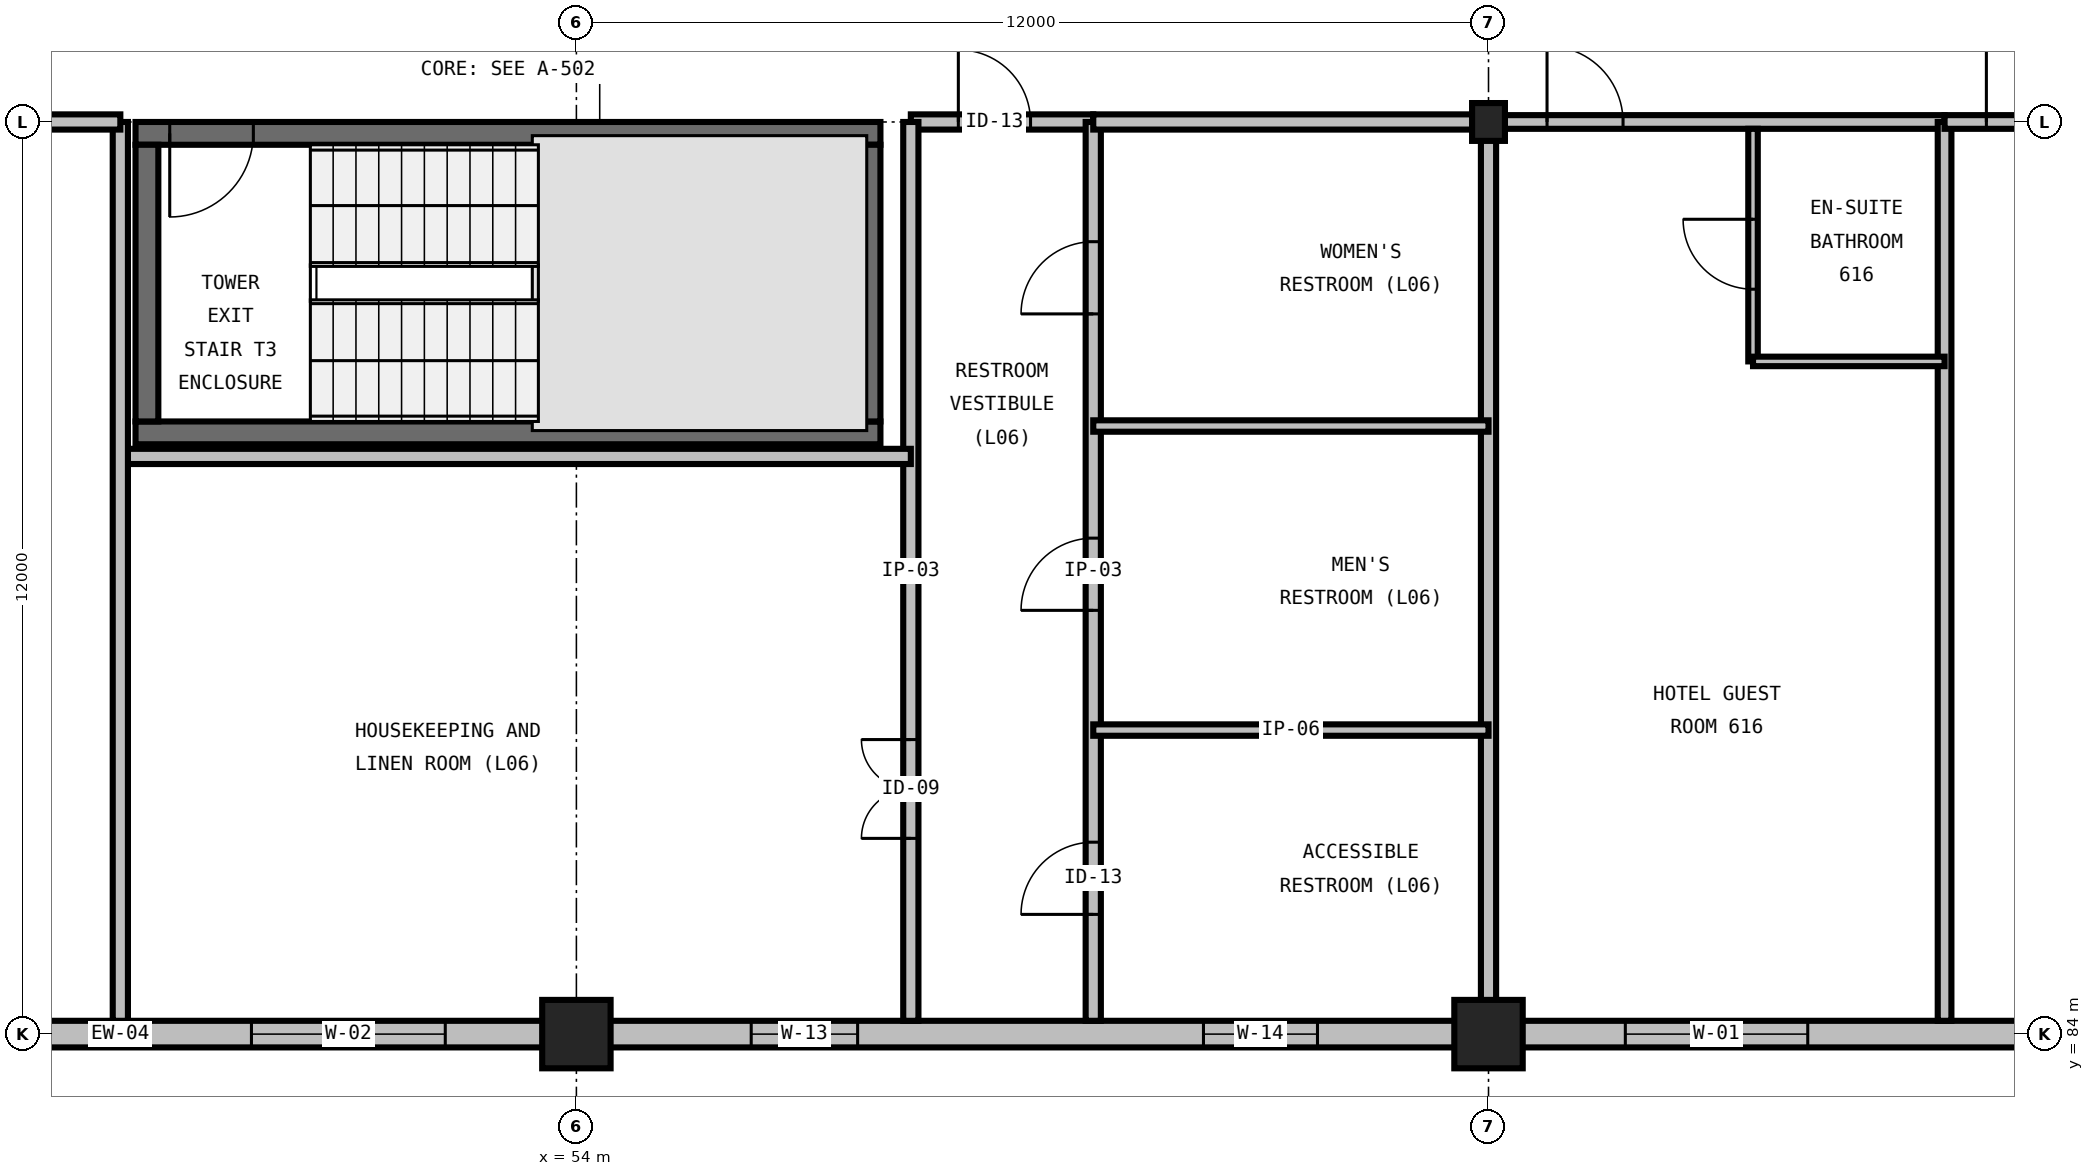
"""IFC4 building model, lengths in metres.
Left out: names, types, materials, properties, quantities, classifications, styles, units other than length and angle.
Written with IfcOpenShell. Run it as: python <this file> out.ifc"""

import sys

from ifc_helpers import new_model, si_unit, direction, frame, frame_2d, origin, origin_2d, place, context, subcontext, project, spatial, rectangle, i_section, extrude, element, fill, save


model = new_model("IFC4")
c1 = context("Model", 3, precision=1e-05, world=origin(), true_north=direction((0.0, 1.0)))
c2 = subcontext(c1, "Body", "Model", "MODEL_VIEW")
j1 = project(units=[si_unit("LENGTHUNIT", "METRE"), si_unit("PLANEANGLEUNIT", "RADIAN")], contexts=[c1])
p1 = place(None, origin())
s1 = spatial("IfcSite", under=j1, at=p1, CompositionType="ELEMENT")
p2 = place(p1, origin())
s2 = spatial("IfcBuilding", under=s1, at=p2, CompositionType="ELEMENT")
p3 = place(p2, frame((0.0, 0.0, 31.2)))
s3 = spatial("IfcBuildingStorey", under=s2, at=p3, CompositionType="ELEMENT", Elevation=31.2)
for number, where, z_axis, x_axis in (
    (1, (54.0, 84.0, 0.0), (0.0, 0.0, 1.0), (1.0, 0.0, 0.0)),
    (2, (66.0, 84.0, 0.0), (0.0, 0.0, 1.0), (1.0, 0.0, 0.0)),
):
    element("IfcColumn", number, at=place(p3, frame(where, z_axis=z_axis, x_axis=x_axis)), inside=s3, PredefinedType="COLUMN", context=c2, shape_type="SweptSolid", body=[
        extrude(rectangle(XDim=0.9, YDim=0.9, at=origin_2d()), origin(), (0.0, 0.0, 1.0), 3.6),
    ])
p4 = place(p3, frame((66.0, 96.0, 0.0), z_axis=(0.0, 0.0, 1.0), x_axis=(1.0, 0.0, 0.0)))
e3 = element("IfcColumn", 3, at=p4, inside=s3, PredefinedType="COLUMN", context=c2, shape_type="SweptSolid", body=[
    extrude(i_section(OverallWidth=0.432, OverallDepth=0.498, WebThickness=0.056, FlangeThickness=0.089, FilletRadius=0.031, at=origin_2d()), origin(), (0.0, 0.0, 1.0), 3.6),
])
p5 = place(p3, frame((48.2, 91.91, 0.0), z_axis=(0.0, 0.0, 1.0), x_axis=(1.0, 0.0, 0.0)))
e4 = element("IfcWall", 4, at=p5, inside=s3, PredefinedType="SHEAR", context=c2, shape_type="SweptSolid", body=[
    extrude(rectangle(XDim=9.8, YDim=0.3, at=frame_2d((4.9, 0.0))), origin(), (0.0, 0.0, 1.0), 3.6),
])
p6 = place(p3, frame((58.0, 95.85, 0.0), z_axis=(0.0, 0.0, 1.0), x_axis=(-1.0, 0.0, 0.0)))
e5 = element("IfcWall", 5, at=p6, inside=s3, PredefinedType="SHEAR", context=c2, shape_type="SweptSolid", body=[
    extrude(rectangle(XDim=9.8, YDim=0.3, at=frame_2d((4.9, 0.0))), origin(), (0.0, 0.0, 1.0), 3.6),
])
p7 = place(p6, frame((8.25, 0.0, 0.0)))
e6 = element("IfcOpeningElement", 6, at=p7, cuts=e5, PredefinedType="OPENING", context=c2, shape_type="SweptSolid", body=[
    extrude(rectangle(XDim=1.1, YDim=2.2, at=frame_2d((0.55, 1.1))), frame((0.0, 0.165, 0.0), z_axis=(0.0, -1.0, 0.0), x_axis=(1.0, 0.0, 0.0)), (0.0, 0.0, 1.0), 0.33),
])
for number, where, z_axis, x_axis in (
    (7, (48.35, 95.7, 0.0), (0.0, 0.0, 1.0), (0.0, -1.0, 0.0)),
    (8, (57.85, 92.06, 0.0), (0.0, 0.0, 1.0), (0.0, 1.0, 0.0)),
):
    element("IfcWall", number, at=place(p3, frame(where, z_axis=z_axis, x_axis=x_axis)), inside=s3, PredefinedType="SHEAR", context=c2, shape_type="SweptSolid", body=[
        extrude(rectangle(XDim=3.64, YDim=0.3, at=frame_2d((1.82, 0.0))), origin(), (0.0, 0.0, 1.0), 3.6),
    ])
p8 = place(p3, frame((42.0, 84.0, 0.0), z_axis=(0.0, 0.0, 1.0), x_axis=(1.0, 0.0, 0.0)))
e9 = element("IfcWall", 9, at=p8, inside=s3, PredefinedType="STANDARD", context=c2, shape_type="SweptSolid", body=[
    extrude(rectangle(XDim=12.0, YDim=0.35, at=frame_2d((6.0, 0.0))), origin(), (0.0, 0.0, 1.0), 2.486),
])
p9 = place(p8, frame((1.8, 0.0, 0.75)))
e10 = element("IfcOpeningElement", 10, at=p9, cuts=e9, PredefinedType="OPENING", context=c2, shape_type="SweptSolid", body=[
    extrude(rectangle(XDim=2.4, YDim=1.65, at=frame_2d((1.2, 0.825))), frame((0.0, 0.19, 0.0), z_axis=(0.0, -1.0, 0.0), x_axis=(1.0, 0.0, 0.0)), (0.0, 0.0, 1.0), 0.38),
])
p10 = place(p8, frame((7.725, 0.0, 0.75)))
e11 = element("IfcOpeningElement", 11, at=p10, cuts=e9, PredefinedType="OPENING", context=c2, shape_type="SweptSolid", body=[
    extrude(rectangle(XDim=2.55, YDim=1.65, at=frame_2d((1.275, 0.825))), frame((0.0, 0.19, 0.0), z_axis=(0.0, -1.0, 0.0), x_axis=(1.0, 0.0, 0.0)), (0.0, 0.0, 1.0), 0.38),
])
p11 = place(p3, frame((54.0, 84.0, 0.0), z_axis=(0.0, 0.0, 1.0), x_axis=(1.0, 0.0, 0.0)))
e12 = element("IfcWall", 12, at=p11, inside=s3, PredefinedType="STANDARD", context=c2, shape_type="SweptSolid", body=[
    extrude(rectangle(XDim=12.0, YDim=0.35, at=frame_2d((6.0, 0.0))), origin(), (0.0, 0.0, 1.0), 2.486),
])
p12 = place(p11, frame((2.3, 0.0, 1.0)))
e13 = element("IfcOpeningElement", 13, at=p12, cuts=e12, PredefinedType="OPENING", context=c2, shape_type="SweptSolid", body=[
    extrude(rectangle(XDim=1.4, YDim=1.4, at=frame_2d((0.7, 0.7))), frame((0.0, 0.19, 0.0), z_axis=(0.0, -1.0, 0.0), x_axis=(1.0, 0.0, 0.0)), (0.0, 0.0, 1.0), 0.38),
])
p13 = place(p11, frame((8.25, 0.0, 1.0)))
e14 = element("IfcOpeningElement", 14, at=p13, cuts=e12, PredefinedType="OPENING", context=c2, shape_type="SweptSolid", body=[
    extrude(rectangle(XDim=1.5, YDim=1.35, at=frame_2d((0.75, 0.675))), frame((0.0, 0.19, 0.0), z_axis=(0.0, -1.0, 0.0), x_axis=(1.0, 0.0, 0.0)), (0.0, 0.0, 1.0), 0.38),
])
p14 = place(p3, frame((66.0, 84.0, 0.0), z_axis=(0.0, 0.0, 1.0), x_axis=(1.0, 0.0, 0.0)))
e15 = element("IfcWall", 15, at=p14, inside=s3, PredefinedType="STANDARD", context=c2, shape_type="SweptSolid", body=[
    extrude(rectangle(XDim=12.0, YDim=0.35, at=frame_2d((6.0, 0.0))), origin(), (0.0, 0.0, 1.0), 2.486),
])
p15 = place(p14, frame((1.8, 0.0, 0.75)))
e16 = element("IfcOpeningElement", 16, at=p15, cuts=e15, PredefinedType="OPENING", context=c2, shape_type="SweptSolid", body=[
    extrude(rectangle(XDim=2.4, YDim=1.65, at=frame_2d((1.2, 0.825))), frame((0.0, 0.19, 0.0), z_axis=(0.0, -1.0, 0.0), x_axis=(1.0, 0.0, 0.0)), (0.0, 0.0, 1.0), 0.38),
])
p16 = place(p14, frame((7.725, 0.0, 0.75)))
e17 = element("IfcOpeningElement", 17, at=p16, cuts=e15, PredefinedType="OPENING", context=c2, shape_type="SweptSolid", body=[
    extrude(rectangle(XDim=2.55, YDim=1.65, at=frame_2d((1.275, 0.825))), frame((0.0, 0.19, 0.0), z_axis=(0.0, -1.0, 0.0), x_axis=(1.0, 0.0, 0.0)), (0.0, 0.0, 1.0), 0.38),
])
p17 = place(p3, frame((58.4, 96.0, 0.0), z_axis=(0.0, 0.0, 1.0), x_axis=(1.0, 0.0, 0.0)))
e18 = element("IfcWall", 18, at=p17, inside=s3, PredefinedType="PARTITIONING", context=c2, shape_type="SweptSolid", body=[
    extrude(rectangle(XDim=2.4, YDim=0.2, at=frame_2d((1.2, 0.0))), origin(), (0.0, 0.0, 1.0), 2.359),
])
p18 = place(p17, frame((0.625, 0.0, 0.0)))
e19 = element("IfcOpeningElement", 19, at=p18, cuts=e18, PredefinedType="OPENING", context=c2, shape_type="SweptSolid", body=[
    extrude(rectangle(XDim=0.95, YDim=2.15, at=frame_2d((0.475, 1.075))), frame((0.0, 0.115, 0.0), z_axis=(0.0, -1.0, 0.0), x_axis=(1.0, 0.0, 0.0)), (0.0, 0.0, 1.0), 0.23),
])
p19 = place(p3, frame((58.4, 84.175, 0.0), z_axis=(0.0, 0.0, 1.0), x_axis=(0.0, 1.0, 0.0)))
e20 = element("IfcWall", 20, at=p19, inside=s3, PredefinedType="PARTITIONING", context=c2, shape_type="SweptSolid", body=[
    extrude(rectangle(XDim=11.825, YDim=0.2, at=frame_2d((5.913, 0.0))), origin(), (0.0, 0.0, 1.0), 3.29),
])
p20 = place(p19, frame((2.4, 0.0, 0.0)))
e21 = element("IfcOpeningElement", 21, at=p20, cuts=e20, PredefinedType="OPENING", context=c2, shape_type="SweptSolid", body=[
    extrude(rectangle(XDim=1.3, YDim=2.2, at=frame_2d((0.65, 1.1))), frame((0.0, 0.115, 0.0), z_axis=(0.0, -1.0, 0.0), x_axis=(1.0, 0.0, 0.0)), (0.0, 0.0, 1.0), 0.23),
])
p21 = place(p3, frame((60.8, 84.175, 0.0), z_axis=(0.0, 0.0, 1.0), x_axis=(0.0, 1.0, 0.0)))
e22 = element("IfcWall", 22, at=p21, inside=s3, PredefinedType="PARTITIONING", context=c2, shape_type="SweptSolid", body=[
    extrude(rectangle(XDim=11.825, YDim=0.2, at=frame_2d((5.913, 0.0))), origin(), (0.0, 0.0, 1.0), 3.29),
])
p22 = place(p21, frame((1.4, 0.0, 0.0)))
e23 = element("IfcOpeningElement", 23, at=p22, cuts=e22, PredefinedType="OPENING", context=c2, shape_type="SweptSolid", body=[
    extrude(rectangle(XDim=0.95, YDim=2.15, at=frame_2d((0.475, 1.075))), frame((0.0, 0.115, 0.0), z_axis=(0.0, -1.0, 0.0), x_axis=(1.0, 0.0, 0.0)), (0.0, 0.0, 1.0), 0.23),
])
p23 = place(p21, frame((5.4, 0.0, 0.0)))
e24 = element("IfcOpeningElement", 24, at=p23, cuts=e22, PredefinedType="OPENING", context=c2, shape_type="SweptSolid", body=[
    extrude(rectangle(XDim=0.95, YDim=2.15, at=frame_2d((0.475, 1.075))), frame((0.0, 0.115, 0.0), z_axis=(0.0, -1.0, 0.0), x_axis=(1.0, 0.0, 0.0)), (0.0, 0.0, 1.0), 0.23),
])
p24 = place(p21, frame((9.3, 0.0, 0.0)))
e25 = element("IfcOpeningElement", 25, at=p24, cuts=e22, PredefinedType="OPENING", context=c2, shape_type="SweptSolid", body=[
    extrude(rectangle(XDim=0.95, YDim=2.15, at=frame_2d((0.475, 1.075))), frame((0.0, 0.115, 0.0), z_axis=(0.0, -1.0, 0.0), x_axis=(1.0, 0.0, 0.0)), (0.0, 0.0, 1.0), 0.23),
])
p25 = place(p3, frame((66.0, 84.175, 0.0), z_axis=(0.0, 0.0, 1.0), x_axis=(0.0, 1.0, 0.0)))
e26 = element("IfcWall", 26, at=p25, inside=s3, PredefinedType="PARTITIONING", context=c2, shape_type="SweptSolid", body=[
    extrude(rectangle(XDim=11.825, YDim=0.2, at=frame_2d((5.913, 0.0))), origin(), (0.0, 0.0, 1.0), 2.59),
])
p26 = place(p3, frame((60.8, 96.0, 0.0), z_axis=(0.0, 0.0, 1.0), x_axis=(1.0, 0.0, 0.0)))
e27 = element("IfcWall", 27, at=p26, inside=s3, PredefinedType="PARTITIONING", context=c2, shape_type="SweptSolid", body=[
    extrude(rectangle(XDim=5.2, YDim=0.2, at=frame_2d((2.6, 0.0))), origin(), (0.0, 0.0, 1.0), 2.359),
])
for number, where, z_axis, x_axis in (
    (28, (60.8, 88.0, 0.0), (0.0, 0.0, 1.0), (1.0, 0.0, 0.0)),
    (29, (60.8, 92.0, 0.0), (0.0, 0.0, 1.0), (1.0, 0.0, 0.0)),
):
    element("IfcWall", number, at=place(p3, frame(where, z_axis=z_axis, x_axis=x_axis)), inside=s3, PredefinedType="PARTITIONING", context=c2, shape_type="SweptSolid", body=[
        extrude(rectangle(XDim=5.2, YDim=0.15, at=frame_2d((2.6, 0.0))), origin(), (0.0, 0.0, 1.0), 3.29),
    ])
p27 = place(p3, frame((48.0, 91.6, 0.0), z_axis=(0.0, 0.0, 1.0), x_axis=(1.0, 0.0, 0.0)))
e30 = element("IfcWall", 30, at=p27, inside=s3, PredefinedType="PARTITIONING", context=c2, shape_type="SweptSolid", body=[
    extrude(rectangle(XDim=10.4, YDim=0.2, at=frame_2d((5.2, 0.0))), origin(), (0.0, 0.0, 1.0), 3.29),
])
p28 = place(p3, frame((48.0, 84.175, 0.0), z_axis=(0.0, 0.0, 1.0), x_axis=(0.0, 1.0, 0.0)))
e31 = element("IfcWall", 31, at=p28, inside=s3, PredefinedType="PARTITIONING", context=c2, shape_type="SweptSolid", body=[
    extrude(rectangle(XDim=11.825, YDim=0.2, at=frame_2d((5.913, 0.0))), origin(), (0.0, 0.0, 1.0), 3.29),
])
p29 = place(p3, frame((42.0, 96.0, 0.0), z_axis=(0.0, 0.0, 1.0), x_axis=(1.0, 0.0, 0.0)))
e32 = element("IfcWall", 32, at=p29, inside=s3, PredefinedType="PARTITIONING", context=c2, shape_type="SweptSolid", body=[
    extrude(rectangle(XDim=6.0, YDim=0.2, at=frame_2d((3.0, 0.0))), origin(), (0.0, 0.0, 1.0), 2.359),
])
p30 = place(p29, frame((2.4, 0.0, 0.0)))
e33 = element("IfcOpeningElement", 33, at=p30, cuts=e32, PredefinedType="OPENING", context=c2, shape_type="SweptSolid", body=[
    extrude(rectangle(XDim=1.8, YDim=2.3, at=frame_2d((0.9, 1.15))), frame((0.0, 0.115, 0.0), z_axis=(0.0, -1.0, 0.0), x_axis=(1.0, 0.0, 0.0)), (0.0, 0.0, 1.0), 0.23),
])
p31 = place(p3, frame((66.0, 96.0, 0.0), z_axis=(0.0, 0.0, 1.0), x_axis=(1.0, 0.0, 0.0)))
e34 = element("IfcWall", 34, at=p31, inside=s3, PredefinedType="PARTITIONING", context=c2, shape_type="SweptSolid", body=[
    extrude(rectangle(XDim=6.0, YDim=0.18, at=frame_2d((3.0, 0.0))), origin(), (0.0, 0.0, 1.0), 2.664),
])
p32 = place(p31, frame((0.77, 0.0, 0.0)))
e35 = element("IfcOpeningElement", 35, at=p32, cuts=e34, PredefinedType="OPENING", context=c2, shape_type="SweptSolid", body=[
    extrude(rectangle(XDim=1.0, YDim=2.15, at=frame_2d((0.5, 1.075))), frame((0.0, 0.105, 0.0), z_axis=(0.0, -1.0, 0.0), x_axis=(1.0, 0.0, 0.0)), (0.0, 0.0, 1.0), 0.21),
])
p33 = place(p3, frame((72.0, 84.175, 0.0), z_axis=(0.0, 0.0, 1.0), x_axis=(0.0, 1.0, 0.0)))
e36 = element("IfcWall", 36, at=p33, inside=s3, PredefinedType="PARTITIONING", context=c2, shape_type="SweptSolid", body=[
    extrude(rectangle(XDim=11.825, YDim=0.18, at=frame_2d((5.913, 0.0))), origin(), (0.0, 0.0, 1.0), 3.29),
])
p34 = place(p3, frame((69.48, 92.85, 0.0), z_axis=(0.0, 0.0, 1.0), x_axis=(0.0, 1.0, 0.0)))
e37 = element("IfcWall", 37, at=p34, inside=s3, PredefinedType="PARTITIONING", context=c2, shape_type="SweptSolid", body=[
    extrude(rectangle(XDim=3.06, YDim=0.125, at=frame_2d((1.53, 0.0))), origin(), (0.0, 0.0, 1.0), 3.29),
])
p35 = place(p34, frame((0.95, 0.0, 0.0)))
e38 = element("IfcOpeningElement", 38, at=p35, cuts=e37, PredefinedType="OPENING", context=c2, shape_type="SweptSolid", body=[
    extrude(rectangle(XDim=0.92, YDim=2.1, at=frame_2d((0.46, 1.05))), frame((0.0, 0.077, 0.0), z_axis=(0.0, -1.0, 0.0), x_axis=(1.0, 0.0, 0.0)), (0.0, 0.0, 1.0), 0.155),
])
p36 = place(p3, frame((69.48, 92.85, 0.0), z_axis=(0.0, 0.0, 1.0), x_axis=(1.0, 0.0, 0.0)))
e39 = element("IfcWall", 39, at=p36, inside=s3, PredefinedType="PARTITIONING", context=c2, shape_type="SweptSolid", body=[
    extrude(rectangle(XDim=2.52, YDim=0.125, at=frame_2d((1.26, 0.0))), origin(), (0.0, 0.0, 1.0), 3.29),
])
p37 = place(p3, frame((72.0, 96.0, 0.0), z_axis=(0.0, 0.0, 1.0), x_axis=(1.0, 0.0, 0.0)))
e40 = element("IfcWall", 40, at=p37, inside=s3, PredefinedType="PARTITIONING", context=c2, shape_type="SweptSolid", body=[
    extrude(rectangle(XDim=6.0, YDim=0.18, at=frame_2d((3.0, 0.0))), origin(), (0.0, 0.0, 1.0), 2.664),
])
p38 = place(p37, frame((0.55, 0.0, 0.0)))
e41 = element("IfcOpeningElement", 41, at=p38, cuts=e40, PredefinedType="OPENING", context=c2, shape_type="SweptSolid", body=[
    extrude(rectangle(XDim=1.0, YDim=2.15, at=frame_2d((0.5, 1.075))), frame((0.0, 0.105, 0.0), z_axis=(0.0, -1.0, 0.0), x_axis=(1.0, 0.0, 0.0)), (0.0, 0.0, 1.0), 0.21),
])
p39 = place(p7, origin())
e42 = element("IfcDoor", 42, at=p39, inside=s3, OperationType="SINGLE_SWING_RIGHT", PredefinedType="DOOR", context=c2, shape_type="SweptSolid", body=[
    extrude(rectangle(XDim=1.1, YDim=2.2, at=frame_2d((0.55, 1.1))), frame((0.0, 0.025, 0.0), z_axis=(0.0, -1.0, 0.0), x_axis=(1.0, 0.0, 0.0)), (0.0, 0.0, 1.0), 0.05),
])
fill(e6, e42)
p40 = place(p10, origin())
e43 = element("IfcWindow", 43, at=p40, inside=s3, PartitioningType="DOUBLE_PANEL_VERTICAL", PredefinedType="WINDOW", context=c2, shape_type="SweptSolid", body=[
    extrude(rectangle(XDim=2.55, YDim=1.65, at=frame_2d((1.275, 0.825))), frame((0.0, 0.03, 0.0), z_axis=(0.0, -1.0, 0.0), x_axis=(1.0, 0.0, 0.0)), (0.0, 0.0, 1.0), 0.06),
])
fill(e11, e43)
p41 = place(p12, origin())
e44 = element("IfcWindow", 44, at=p41, inside=s3, PartitioningType="SINGLE_PANEL", PredefinedType="WINDOW", context=c2, shape_type="SweptSolid", body=[
    extrude(rectangle(XDim=1.4, YDim=1.4, at=frame_2d((0.7, 0.7))), frame((0.0, 0.03, 0.0), z_axis=(0.0, -1.0, 0.0), x_axis=(1.0, 0.0, 0.0)), (0.0, 0.0, 1.0), 0.06),
])
fill(e13, e44)
p42 = place(p13, origin())
e45 = element("IfcWindow", 45, at=p42, inside=s3, PartitioningType="SINGLE_PANEL", PredefinedType="WINDOW", context=c2, shape_type="SweptSolid", body=[
    extrude(rectangle(XDim=1.5, YDim=1.35, at=frame_2d((0.75, 0.675))), frame((0.0, 0.03, 0.0), z_axis=(0.0, -1.0, 0.0), x_axis=(1.0, 0.0, 0.0)), (0.0, 0.0, 1.0), 0.06),
])
fill(e14, e45)
p43 = place(p15, origin())
e46 = element("IfcWindow", 46, at=p43, inside=s3, PartitioningType="DOUBLE_PANEL_VERTICAL", PredefinedType="WINDOW", context=c2, shape_type="SweptSolid", body=[
    extrude(rectangle(XDim=2.4, YDim=1.65, at=frame_2d((1.2, 0.825))), frame((0.0, 0.03, 0.0), z_axis=(0.0, -1.0, 0.0), x_axis=(1.0, 0.0, 0.0)), (0.0, 0.0, 1.0), 0.06),
])
fill(e16, e46)
p44 = place(p18, origin())
e47 = element("IfcDoor", 47, at=p44, inside=s3, OperationType="SINGLE_SWING_LEFT", PredefinedType="DOOR", context=c2, shape_type="SweptSolid", body=[
    extrude(rectangle(XDim=0.95, YDim=2.15, at=frame_2d((0.475, 1.075))), frame((0.0, 0.025, 0.0), z_axis=(0.0, -1.0, 0.0), x_axis=(1.0, 0.0, 0.0)), (0.0, 0.0, 1.0), 0.05),
])
fill(e19, e47)
p45 = place(p20, origin())
e48 = element("IfcDoor", 48, at=p45, inside=s3, OperationType="DOUBLE_DOOR_SINGLE_SWING", PredefinedType="DOOR", context=c2, shape_type="SweptSolid", body=[
    extrude(rectangle(XDim=1.3, YDim=2.2, at=frame_2d((0.65, 1.1))), frame((0.0, 0.025, 0.0), z_axis=(0.0, -1.0, 0.0), x_axis=(1.0, 0.0, 0.0)), (0.0, 0.0, 1.0), 0.05),
])
fill(e21, e48)
p46 = place(p22, origin())
e49 = element("IfcDoor", 49, at=p46, inside=s3, OperationType="SINGLE_SWING_LEFT", PredefinedType="DOOR", context=c2, shape_type="SweptSolid", body=[
    extrude(rectangle(XDim=0.95, YDim=2.15, at=frame_2d((0.475, 1.075))), frame((0.0, 0.025, 0.0), z_axis=(0.0, -1.0, 0.0), x_axis=(1.0, 0.0, 0.0)), (0.0, 0.0, 1.0), 0.05),
])
fill(e23, e49)
p47 = place(p23, origin())
e50 = element("IfcDoor", 50, at=p47, inside=s3, OperationType="SINGLE_SWING_LEFT", PredefinedType="DOOR", context=c2, shape_type="SweptSolid", body=[
    extrude(rectangle(XDim=0.95, YDim=2.15, at=frame_2d((0.475, 1.075))), frame((0.0, 0.025, 0.0), z_axis=(0.0, -1.0, 0.0), x_axis=(1.0, 0.0, 0.0)), (0.0, 0.0, 1.0), 0.05),
])
fill(e24, e50)
p48 = place(p24, origin())
e51 = element("IfcDoor", 51, at=p48, inside=s3, OperationType="SINGLE_SWING_LEFT", PredefinedType="DOOR", context=c2, shape_type="SweptSolid", body=[
    extrude(rectangle(XDim=0.95, YDim=2.15, at=frame_2d((0.475, 1.075))), frame((0.0, 0.025, 0.0), z_axis=(0.0, -1.0, 0.0), x_axis=(1.0, 0.0, 0.0)), (0.0, 0.0, 1.0), 0.05),
])
fill(e25, e51)
p49 = place(p32, origin())
e52 = element("IfcDoor", 52, at=p49, inside=s3, OperationType="SINGLE_SWING_LEFT", PredefinedType="DOOR", context=c2, shape_type="SweptSolid", body=[
    extrude(rectangle(XDim=1.0, YDim=2.15, at=frame_2d((0.5, 1.075))), frame((0.0, 0.025, 0.0), z_axis=(0.0, -1.0, 0.0), x_axis=(1.0, 0.0, 0.0)), (0.0, 0.0, 1.0), 0.05),
])
fill(e35, e52)
p50 = place(p35, origin())
e53 = element("IfcDoor", 53, at=p50, inside=s3, OperationType="SINGLE_SWING_RIGHT", PredefinedType="DOOR", context=c2, shape_type="SweptSolid", body=[
    extrude(rectangle(XDim=0.92, YDim=2.1, at=frame_2d((0.46, 1.05))), frame((0.0, 0.025, 0.0), z_axis=(0.0, -1.0, 0.0), x_axis=(1.0, 0.0, 0.0)), (0.0, 0.0, 1.0), 0.05),
])
fill(e38, e53)
p51 = place(p38, origin())
e54 = element("IfcDoor", 54, at=p51, inside=s3, OperationType="SINGLE_SWING_LEFT", PredefinedType="DOOR", context=c2, shape_type="SweptSolid", body=[
    extrude(rectangle(XDim=1.0, YDim=2.15, at=frame_2d((0.5, 1.075))), frame((0.0, 0.025, 0.0), z_axis=(0.0, -1.0, 0.0), x_axis=(1.0, 0.0, 0.0)), (0.0, 0.0, 1.0), 0.05),
])
fill(e41, e54)
save(model, sys.argv[1])
